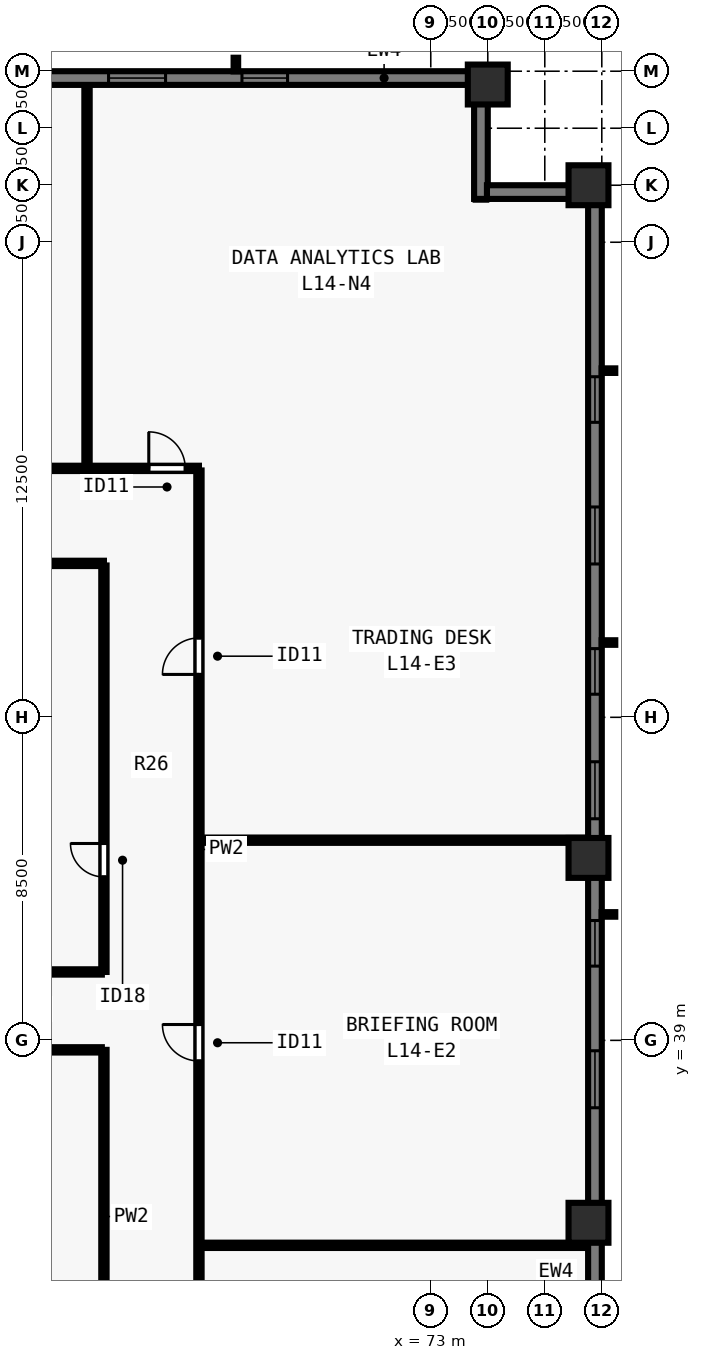
"""IFC4 building model, lengths in metres.
Left out: names, types, materials, properties, quantities, classifications, styles, units other than length and angle.
Written with IfcOpenShell. Run it as: python <this file> out.ifc"""

import sys

from ifc_helpers import new_model, si_unit, direction, frame, frame_2d, origin, origin_2d, place, context, subcontext, project, spatial, rectangle, extrude, element, fill, save


model = new_model("IFC4")
c1 = context("Model", 3, precision=1e-05, world=origin(), true_north=direction((0.0, 1.0)))
c2 = subcontext(c1, "Body", "Model", "MODEL_VIEW")
j1 = project(units=[si_unit("LENGTHUNIT", "METRE"), si_unit("PLANEANGLEUNIT", "RADIAN")], contexts=[c1])
p1 = place(None, origin())
s1 = spatial("IfcSite", under=j1, at=p1, CompositionType="ELEMENT")
p2 = place(p1, origin())
s2 = spatial("IfcBuilding", under=s1, at=p2, CompositionType="ELEMENT")
p3 = place(p2, frame((0.0, 0.0, 55.0)))
s3 = spatial("IfcBuildingStorey", under=s2, at=p3, CompositionType="ELEMENT", Elevation=55.0)
for number, where, z_axis, x_axis in (
    (1, (77.15, 34.2, 0.0), (0.0, 0.0, 1.0), (0.0, 1.0, 0.0)),
    (2, (77.15, 43.8, 0.0), (0.0, 0.0, 1.0), (0.0, 1.0, 0.0)),
    (3, (77.15, 61.5, 0.0), (0.0, 0.0, 1.0), (0.0, 1.0, 0.0)),
    (4, (74.5, 64.15, 0.0), (0.0, 0.0, 1.0), (1.0, 0.0, 0.0)),
):
    element("IfcColumn", number, at=place(p3, frame(where, z_axis=z_axis, x_axis=x_axis)), inside=s3, PredefinedType="COLUMN", context=c2, shape_type="SweptSolid", body=[
        extrude(rectangle(XDim=1.05, YDim=1.05, at=origin_2d()), origin(), (0.0, 0.0, 1.0), 3.5),
    ])
p4 = place(p3, frame((29.5, 64.32, 0.0), z_axis=(0.0, 0.0, 1.0), x_axis=(1.0, 0.0, 0.0)))
e5 = element("IfcWall", 5, at=p4, inside=s3, PredefinedType="SOLIDWALL", context=c2, shape_type="SweptSolid", body=[
    extrude(rectangle(XDim=44.662, YDim=0.36, at=frame_2d((22.331, 0.0))), origin(), (0.0, 0.0, 1.0), 3.28),
])
p5 = place(p4, frame((4.93, 0.0, 0.8)))
e6 = element("IfcOpeningElement", 6, at=p5, cuts=e5, PredefinedType="OPENING", context=c2, shape_type="SweptSolid", body=[
    extrude(rectangle(XDim=1.2, YDim=1.544, at=frame_2d((0.6, 0.772))), frame((0.0, 0.19, 0.0), z_axis=(0.0, -1.0, 0.0), x_axis=(1.0, 0.0, 0.0)), (0.0, 0.0, 1.0), 0.38),
])
p6 = place(p4, frame((7.29, 0.0, 0.8)))
e7 = element("IfcOpeningElement", 7, at=p6, cuts=e5, PredefinedType="OPENING", context=c2, shape_type="SweptSolid", body=[
    extrude(rectangle(XDim=1.5, YDim=1.544, at=frame_2d((0.75, 0.772))), frame((0.0, 0.19, 0.0), z_axis=(0.0, -1.0, 0.0), x_axis=(1.0, 0.0, 0.0)), (0.0, 0.0, 1.0), 0.38),
])
p7 = place(p4, frame((11.65, 0.0, 0.8)))
e8 = element("IfcOpeningElement", 8, at=p7, cuts=e5, PredefinedType="OPENING", context=c2, shape_type="SweptSolid", body=[
    extrude(rectangle(XDim=1.2, YDim=1.544, at=frame_2d((0.6, 0.772))), frame((0.0, 0.19, 0.0), z_axis=(0.0, -1.0, 0.0), x_axis=(1.0, 0.0, 0.0)), (0.0, 0.0, 1.0), 0.38),
])
p8 = place(p4, frame((14.861, 0.0, 0.8)))
e9 = element("IfcOpeningElement", 9, at=p8, cuts=e5, PredefinedType="OPENING", context=c2, shape_type="SweptSolid", body=[
    extrude(rectangle(XDim=1.5, YDim=1.544, at=frame_2d((0.75, 0.772))), frame((0.0, 0.19, 0.0), z_axis=(0.0, -1.0, 0.0), x_axis=(1.0, 0.0, 0.0)), (0.0, 0.0, 1.0), 0.38),
])
p9 = place(p4, frame((18.821, 0.0, 0.8)))
e10 = element("IfcOpeningElement", 10, at=p9, cuts=e5, PredefinedType="OPENING", context=c2, shape_type="SweptSolid", body=[
    extrude(rectangle(XDim=1.2, YDim=1.544, at=frame_2d((0.6, 0.772))), frame((0.0, 0.19, 0.0), z_axis=(0.0, -1.0, 0.0), x_axis=(1.0, 0.0, 0.0)), (0.0, 0.0, 1.0), 0.38),
])
p10 = place(p4, frame((20.731, 0.0, 0.8)))
e11 = element("IfcOpeningElement", 11, at=p10, cuts=e5, PredefinedType="OPENING", context=c2, shape_type="SweptSolid", body=[
    extrude(rectangle(XDim=1.5, YDim=1.544, at=frame_2d((0.75, 0.772))), frame((0.0, 0.19, 0.0), z_axis=(0.0, -1.0, 0.0), x_axis=(1.0, 0.0, 0.0)), (0.0, 0.0, 1.0), 0.38),
])
p11 = place(p4, frame((25.091, 0.0, 0.8)))
e12 = element("IfcOpeningElement", 12, at=p11, cuts=e5, PredefinedType="OPENING", context=c2, shape_type="SweptSolid", body=[
    extrude(rectangle(XDim=1.2, YDim=1.544, at=frame_2d((0.6, 0.772))), frame((0.0, 0.19, 0.0), z_axis=(0.0, -1.0, 0.0), x_axis=(1.0, 0.0, 0.0)), (0.0, 0.0, 1.0), 0.38),
])
p12 = place(p4, frame((28.302, 0.0, 0.8)))
e13 = element("IfcOpeningElement", 13, at=p12, cuts=e5, PredefinedType="OPENING", context=c2, shape_type="SweptSolid", body=[
    extrude(rectangle(XDim=1.5, YDim=1.544, at=frame_2d((0.75, 0.772))), frame((0.0, 0.19, 0.0), z_axis=(0.0, -1.0, 0.0), x_axis=(1.0, 0.0, 0.0)), (0.0, 0.0, 1.0), 0.38),
])
p13 = place(p4, frame((31.812, 0.0, 0.8)))
e14 = element("IfcOpeningElement", 14, at=p13, cuts=e5, PredefinedType="OPENING", context=c2, shape_type="SweptSolid", body=[
    extrude(rectangle(XDim=1.2, YDim=1.544, at=frame_2d((0.6, 0.772))), frame((0.0, 0.19, 0.0), z_axis=(0.0, -1.0, 0.0), x_axis=(1.0, 0.0, 0.0)), (0.0, 0.0, 1.0), 0.38),
])
p14 = place(p4, frame((35.022, 0.0, 0.8)))
e15 = element("IfcOpeningElement", 15, at=p14, cuts=e5, PredefinedType="OPENING", context=c2, shape_type="SweptSolid", body=[
    extrude(rectangle(XDim=1.5, YDim=1.544, at=frame_2d((0.75, 0.772))), frame((0.0, 0.19, 0.0), z_axis=(0.0, -1.0, 0.0), x_axis=(1.0, 0.0, 0.0)), (0.0, 0.0, 1.0), 0.38),
])
p15 = place(p4, frame((38.532, 0.0, 0.8)))
e16 = element("IfcOpeningElement", 16, at=p15, cuts=e5, PredefinedType="OPENING", context=c2, shape_type="SweptSolid", body=[
    extrude(rectangle(XDim=1.2, YDim=1.544, at=frame_2d((0.6, 0.772))), frame((0.0, 0.19, 0.0), z_axis=(0.0, -1.0, 0.0), x_axis=(1.0, 0.0, 0.0)), (0.0, 0.0, 1.0), 0.38),
])
p16 = place(p3, frame((74.32, 64.5, 0.0), z_axis=(0.0, 0.0, 1.0), x_axis=(0.0, -1.0, 0.0)))
e17 = element("IfcWall", 17, at=p16, inside=s3, PredefinedType="SOLIDWALL", context=c2, shape_type="SweptSolid", body=[
    extrude(rectangle(XDim=3.36, YDim=0.36, at=frame_2d((1.68, 0.0))), origin(), (0.0, 0.0, 1.0), 3.28),
])
p17 = place(p3, frame((74.478, 61.32, 0.0), z_axis=(0.0, 0.0, 1.0), x_axis=(1.0, 0.0, 0.0)))
e18 = element("IfcWall", 18, at=p17, inside=s3, PredefinedType="SOLIDWALL", context=c2, shape_type="SweptSolid", body=[
    extrude(rectangle(XDim=2.684, YDim=0.36, at=frame_2d((1.342, 0.0))), origin(), (0.0, 0.0, 1.0), 3.28),
])
p18 = place(p3, frame((77.32, 61.5, 0.0), z_axis=(0.0, 0.0, 1.0), x_axis=(0.0, -1.0, 0.0)))
e19 = element("IfcWall", 19, at=p18, inside=s3, PredefinedType="SOLIDWALL", context=c2, shape_type="SweptSolid", body=[
    extrude(rectangle(XDim=29.162, YDim=0.36, at=frame_2d((14.581, 0.0))), origin(), (0.0, 0.0, 1.0), 3.28),
])
p19 = place(p18, frame((5.039, 0.0, 0.8)))
e20 = element("IfcOpeningElement", 20, at=p19, cuts=e19, PredefinedType="OPENING", context=c2, shape_type="SweptSolid", body=[
    extrude(rectangle(XDim=1.2, YDim=1.544, at=frame_2d((0.6, 0.772))), frame((0.0, 0.19, 0.0), z_axis=(0.0, -1.0, 0.0), x_axis=(1.0, 0.0, 0.0)), (0.0, 0.0, 1.0), 0.38),
])
p20 = place(p18, frame((8.466, 0.0, 0.8)))
e21 = element("IfcOpeningElement", 21, at=p20, cuts=e19, PredefinedType="OPENING", context=c2, shape_type="SweptSolid", body=[
    extrude(rectangle(XDim=1.5, YDim=1.544, at=frame_2d((0.75, 0.772))), frame((0.0, 0.19, 0.0), z_axis=(0.0, -1.0, 0.0), x_axis=(1.0, 0.0, 0.0)), (0.0, 0.0, 1.0), 0.38),
])
p21 = place(p18, frame((12.192, 0.0, 0.8)))
e22 = element("IfcOpeningElement", 22, at=p21, cuts=e19, PredefinedType="OPENING", context=c2, shape_type="SweptSolid", body=[
    extrude(rectangle(XDim=1.2, YDim=1.544, at=frame_2d((0.6, 0.772))), frame((0.0, 0.19, 0.0), z_axis=(0.0, -1.0, 0.0), x_axis=(1.0, 0.0, 0.0)), (0.0, 0.0, 1.0), 0.38),
])
p22 = place(p18, frame((15.169, 0.0, 0.8)))
e23 = element("IfcOpeningElement", 23, at=p22, cuts=e19, PredefinedType="OPENING", context=c2, shape_type="SweptSolid", body=[
    extrude(rectangle(XDim=1.5, YDim=1.544, at=frame_2d((0.75, 0.772))), frame((0.0, 0.19, 0.0), z_axis=(0.0, -1.0, 0.0), x_axis=(1.0, 0.0, 0.0)), (0.0, 0.0, 1.0), 0.38),
])
p23 = place(p18, frame((19.346, 0.0, 0.8)))
e24 = element("IfcOpeningElement", 24, at=p23, cuts=e19, PredefinedType="OPENING", context=c2, shape_type="SweptSolid", body=[
    extrude(rectangle(XDim=1.2, YDim=1.544, at=frame_2d((0.6, 0.772))), frame((0.0, 0.19, 0.0), z_axis=(0.0, -1.0, 0.0), x_axis=(1.0, 0.0, 0.0)), (0.0, 0.0, 1.0), 0.38),
])
p24 = place(p18, frame((22.773, 0.0, 0.8)))
e25 = element("IfcOpeningElement", 25, at=p24, cuts=e19, PredefinedType="OPENING", context=c2, shape_type="SweptSolid", body=[
    extrude(rectangle(XDim=1.5, YDim=1.544, at=frame_2d((0.75, 0.772))), frame((0.0, 0.19, 0.0), z_axis=(0.0, -1.0, 0.0), x_axis=(1.0, 0.0, 0.0)), (0.0, 0.0, 1.0), 0.38),
])
p25 = place(p3, frame((37.1, 54.05, 0.0), z_axis=(0.0, 0.0, 1.0), x_axis=(1.0, 0.0, 0.0)))
e26 = element("IfcWall", 26, at=p25, inside=s3, PredefinedType="PARTITIONING", context=c2, shape_type="SweptSolid", body=[
    extrude(rectangle(XDim=29.8, YDim=0.14, at=frame_2d((14.9, 0.0))), origin(), (0.0, 0.0, 1.0), 3.28),
])
p26 = place(p25, frame((3.522, 0.0, 0.0)))
e27 = element("IfcOpeningElement", 27, at=p26, cuts=e26, PredefinedType="OPENING", context=c2, shape_type="SweptSolid", body=[
    extrude(rectangle(XDim=0.96, YDim=2.12, at=frame_2d((0.48, 1.06))), frame((0.0, 0.08, 0.0), z_axis=(0.0, -1.0, 0.0), x_axis=(1.0, 0.0, 0.0)), (0.0, 0.0, 1.0), 0.16),
])
p27 = place(p25, frame((8.06, 0.0, 0.0)))
e28 = element("IfcOpeningElement", 28, at=p27, cuts=e26, PredefinedType="OPENING", context=c2, shape_type="SweptSolid", body=[
    extrude(rectangle(XDim=0.96, YDim=2.12, at=frame_2d((0.48, 1.06))), frame((0.0, 0.08, 0.0), z_axis=(0.0, -1.0, 0.0), x_axis=(1.0, 0.0, 0.0)), (0.0, 0.0, 1.0), 0.16),
])
p28 = place(p25, frame((20.6, 0.0, 0.0)))
e29 = element("IfcOpeningElement", 29, at=p28, cuts=e26, PredefinedType="OPENING", context=c2, shape_type="SweptSolid", body=[
    extrude(rectangle(XDim=0.96, YDim=2.12, at=frame_2d((0.48, 1.06))), frame((0.0, 0.08, 0.0), z_axis=(0.0, -1.0, 0.0), x_axis=(1.0, 0.0, 0.0)), (0.0, 0.0, 1.0), 0.16),
])
p29 = place(p25, frame((28.48, 0.0, 0.0)))
e30 = element("IfcOpeningElement", 30, at=p29, cuts=e26, PredefinedType="OPENING", context=c2, shape_type="SweptSolid", body=[
    extrude(rectangle(XDim=0.96, YDim=2.12, at=frame_2d((0.48, 1.06))), frame((0.0, 0.08, 0.0), z_axis=(0.0, -1.0, 0.0), x_axis=(1.0, 0.0, 0.0)), (0.0, 0.0, 1.0), 0.16),
])
p30 = place(p3, frame((66.9, 24.005, 0.0), z_axis=(0.0, 0.0, 1.0), x_axis=(0.0, 1.0, 0.0)))
e31 = element("IfcWall", 31, at=p30, inside=s3, PredefinedType="PARTITIONING", context=c2, shape_type="SweptSolid", body=[
    extrude(rectangle(XDim=29.99, YDim=0.14, at=frame_2d((14.995, 0.0))), origin(), (0.0, 0.0, 1.0), 3.28),
])
p31 = place(p30, frame((4.344, 0.0, 0.0)))
e32 = element("IfcOpeningElement", 32, at=p31, cuts=e31, PredefinedType="OPENING", context=c2, shape_type="SweptSolid", body=[
    extrude(rectangle(XDim=0.96, YDim=2.12, at=frame_2d((0.48, 1.06))), frame((0.0, 0.08, 0.0), z_axis=(0.0, -1.0, 0.0), x_axis=(1.0, 0.0, 0.0)), (0.0, 0.0, 1.0), 0.16),
])
p32 = place(p30, frame((14.452, 0.0, 0.0)))
e33 = element("IfcOpeningElement", 33, at=p32, cuts=e31, PredefinedType="OPENING", context=c2, shape_type="SweptSolid", body=[
    extrude(rectangle(XDim=0.96, YDim=2.12, at=frame_2d((0.48, 1.06))), frame((0.0, 0.08, 0.0), z_axis=(0.0, -1.0, 0.0), x_axis=(1.0, 0.0, 0.0)), (0.0, 0.0, 1.0), 0.16),
])
p33 = place(p30, frame((24.623, 0.0, 0.0)))
e34 = element("IfcOpeningElement", 34, at=p33, cuts=e31, PredefinedType="OPENING", context=c2, shape_type="SweptSolid", body=[
    extrude(rectangle(XDim=0.96, YDim=2.12, at=frame_2d((0.48, 1.06))), frame((0.0, 0.08, 0.0), z_axis=(0.0, -1.0, 0.0), x_axis=(1.0, 0.0, 0.0)), (0.0, 0.0, 1.0), 0.16),
])
p34 = place(p3, frame((39.6, 51.55, 0.0), z_axis=(0.0, 0.0, 1.0), x_axis=(1.0, 0.0, 0.0)))
e35 = element("IfcWall", 35, at=p34, inside=s3, PredefinedType="PARTITIONING", context=c2, shape_type="SweptSolid", body=[
    extrude(rectangle(XDim=24.8, YDim=0.14, at=frame_2d((12.4, 0.0))), origin(), (0.0, 0.0, 1.0), 3.28),
])
p35 = place(p34, frame((3.2, 0.0, 0.0)))
e36 = element("IfcOpeningElement", 36, at=p35, cuts=e35, PredefinedType="OPENING", context=c2, shape_type="SweptSolid", body=[
    extrude(rectangle(XDim=0.96, YDim=2.12, at=frame_2d((0.48, 1.06))), frame((0.0, 0.08, 0.0), z_axis=(0.0, -1.0, 0.0), x_axis=(1.0, 0.0, 0.0)), (0.0, 0.0, 1.0), 0.16),
])
p36 = place(p34, frame((18.4, 0.0, 0.0)))
e37 = element("IfcOpeningElement", 37, at=p36, cuts=e35, PredefinedType="OPENING", context=c2, shape_type="SweptSolid", body=[
    extrude(rectangle(XDim=0.96, YDim=2.12, at=frame_2d((0.48, 1.06))), frame((0.0, 0.08, 0.0), z_axis=(0.0, -1.0, 0.0), x_axis=(1.0, 0.0, 0.0)), (0.0, 0.0, 1.0), 0.16),
])
p37 = place(p3, frame((64.4, 26.505, 0.0), z_axis=(0.0, 0.0, 1.0), x_axis=(0.0, 1.0, 0.0)))
e38 = element("IfcWall", 38, at=p37, inside=s3, PredefinedType="PARTITIONING", context=c2, shape_type="SweptSolid", body=[
    extrude(rectangle(XDim=12.245, YDim=0.14, at=frame_2d((6.123, 0.0))), origin(), (0.0, 0.0, 1.0), 3.28),
])
p38 = place(p37, frame((2.445, 0.0, 0.0)))
e39 = element("IfcOpeningElement", 39, at=p38, cuts=e38, PredefinedType="OPENING", context=c2, shape_type="SweptSolid", body=[
    extrude(rectangle(XDim=0.88, YDim=2.1, at=frame_2d((0.44, 1.05))), frame((0.0, 0.08, 0.0), z_axis=(0.0, -1.0, 0.0), x_axis=(1.0, 0.0, 0.0)), (0.0, 0.0, 1.0), 0.16),
])
p39 = place(p3, frame((64.4, 40.8, 0.0), z_axis=(0.0, 0.0, 1.0), x_axis=(0.0, 1.0, 0.0)))
e40 = element("IfcWall", 40, at=p39, inside=s3, PredefinedType="PARTITIONING", context=c2, shape_type="SweptSolid", body=[
    extrude(rectangle(XDim=10.695, YDim=0.14, at=frame_2d((5.348, 0.0))), origin(), (0.0, 0.0, 1.0), 3.28),
])
p40 = place(p39, frame((2.5, 0.0, 0.0)))
e41 = element("IfcOpeningElement", 41, at=p40, cuts=e40, PredefinedType="OPENING", context=c2, shape_type="SweptSolid", body=[
    extrude(rectangle(XDim=0.88, YDim=2.1, at=frame_2d((0.44, 1.05))), frame((0.0, 0.08, 0.0), z_axis=(0.0, -1.0, 0.0), x_axis=(1.0, 0.0, 0.0)), (0.0, 0.0, 1.0), 0.16),
])
for number, where, z_axis, x_axis in (
    (42, (60.76, 38.75, 0.0), (0.0, 0.0, 1.0), (1.0, 0.0, 0.0)),
    (43, (60.76, 40.8, 0.0), (0.0, 0.0, 1.0), (1.0, 0.0, 0.0)),
):
    element("IfcWall", number, at=place(p3, frame(where, z_axis=z_axis, x_axis=x_axis)), inside=s3, PredefinedType="PARTITIONING", context=c2, shape_type="SweptSolid", body=[
        extrude(rectangle(XDim=3.585, YDim=0.14, at=frame_2d((1.792, 0.0))), origin(), (0.0, 0.0, 1.0), 3.28),
    ])
p41 = place(p3, frame((63.955, 54.15, 0.0), z_axis=(0.0, 0.0, 1.0), x_axis=(0.0, 1.0, 0.0)))
e44 = element("IfcWall", 44, at=p41, inside=s3, PredefinedType="PARTITIONING", context=c2, shape_type="SweptSolid", body=[
    extrude(rectangle(XDim=9.93, YDim=0.14, at=frame_2d((4.965, 0.0))), origin(), (0.0, 0.0, 1.0), 3.28),
])
for number, where, z_axis, x_axis in (
    (45, (67.0, 33.607, 0.0), (0.0, 0.0, 1.0), (1.0, 0.0, 0.0)),
    (46, (67.0, 44.267, 0.0), (0.0, 0.0, 1.0), (1.0, 0.0, 0.0)),
):
    element("IfcWall", number, at=place(p3, frame(where, z_axis=z_axis, x_axis=x_axis)), inside=s3, PredefinedType="PARTITIONING", context=c2, shape_type="SweptSolid", body=[
        extrude(rectangle(XDim=10.08, YDim=0.14, at=frame_2d((5.04, 0.0))), origin(), (0.0, 0.0, 1.0), 2.439),
    ])
p42 = place(p14, origin())
e47 = element("IfcWindow", 47, at=p42, inside=s3, PartitioningType="SINGLE_PANEL", PredefinedType="WINDOW", context=c2, shape_type="SweptSolid", body=[
    extrude(rectangle(XDim=1.5, YDim=1.544, at=frame_2d((0.75, 0.772))), frame((0.0, -0.05, 0.0), z_axis=(0.0, -1.0, 0.0), x_axis=(1.0, 0.0, 0.0)), (0.0, 0.0, 1.0), 0.06),
])
fill(e15, e47)
p43 = place(p15, origin())
e48 = element("IfcWindow", 48, at=p43, inside=s3, PartitioningType="SINGLE_PANEL", PredefinedType="WINDOW", context=c2, shape_type="SweptSolid", body=[
    extrude(rectangle(XDim=1.2, YDim=1.544, at=frame_2d((0.6, 0.772))), frame((0.0, -0.05, 0.0), z_axis=(0.0, -1.0, 0.0), x_axis=(1.0, 0.0, 0.0)), (0.0, 0.0, 1.0), 0.06),
])
fill(e16, e48)
p44 = place(p19, origin())
e49 = element("IfcWindow", 49, at=p44, inside=s3, PartitioningType="SINGLE_PANEL", PredefinedType="WINDOW", context=c2, shape_type="SweptSolid", body=[
    extrude(rectangle(XDim=1.2, YDim=1.544, at=frame_2d((0.6, 0.772))), frame((0.0, -0.05, 0.0), z_axis=(0.0, -1.0, 0.0), x_axis=(1.0, 0.0, 0.0)), (0.0, 0.0, 1.0), 0.06),
])
fill(e20, e49)
p45 = place(p20, origin())
e50 = element("IfcWindow", 50, at=p45, inside=s3, PartitioningType="SINGLE_PANEL", PredefinedType="WINDOW", context=c2, shape_type="SweptSolid", body=[
    extrude(rectangle(XDim=1.5, YDim=1.544, at=frame_2d((0.75, 0.772))), frame((0.0, -0.05, 0.0), z_axis=(0.0, -1.0, 0.0), x_axis=(1.0, 0.0, 0.0)), (0.0, 0.0, 1.0), 0.06),
])
fill(e21, e50)
p46 = place(p21, origin())
e51 = element("IfcWindow", 51, at=p46, inside=s3, PartitioningType="SINGLE_PANEL", PredefinedType="WINDOW", context=c2, shape_type="SweptSolid", body=[
    extrude(rectangle(XDim=1.2, YDim=1.544, at=frame_2d((0.6, 0.772))), frame((0.0, -0.05, 0.0), z_axis=(0.0, -1.0, 0.0), x_axis=(1.0, 0.0, 0.0)), (0.0, 0.0, 1.0), 0.06),
])
fill(e22, e51)
p47 = place(p22, origin())
e52 = element("IfcWindow", 52, at=p47, inside=s3, PartitioningType="SINGLE_PANEL", PredefinedType="WINDOW", context=c2, shape_type="SweptSolid", body=[
    extrude(rectangle(XDim=1.5, YDim=1.544, at=frame_2d((0.75, 0.772))), frame((0.0, -0.05, 0.0), z_axis=(0.0, -1.0, 0.0), x_axis=(1.0, 0.0, 0.0)), (0.0, 0.0, 1.0), 0.06),
])
fill(e23, e52)
p48 = place(p23, origin())
e53 = element("IfcWindow", 53, at=p48, inside=s3, PartitioningType="SINGLE_PANEL", PredefinedType="WINDOW", context=c2, shape_type="SweptSolid", body=[
    extrude(rectangle(XDim=1.2, YDim=1.544, at=frame_2d((0.6, 0.772))), frame((0.0, -0.05, 0.0), z_axis=(0.0, -1.0, 0.0), x_axis=(1.0, 0.0, 0.0)), (0.0, 0.0, 1.0), 0.06),
])
fill(e24, e53)
p49 = place(p24, origin())
e54 = element("IfcWindow", 54, at=p49, inside=s3, PartitioningType="SINGLE_PANEL", PredefinedType="WINDOW", context=c2, shape_type="SweptSolid", body=[
    extrude(rectangle(XDim=1.5, YDim=1.544, at=frame_2d((0.75, 0.772))), frame((0.0, -0.05, 0.0), z_axis=(0.0, -1.0, 0.0), x_axis=(1.0, 0.0, 0.0)), (0.0, 0.0, 1.0), 0.06),
])
fill(e25, e54)
p50 = place(p40, origin())
e55 = element("IfcDoor", 55, at=p50, inside=s3, OperationType="SINGLE_SWING_RIGHT", PredefinedType="DOOR", context=c2, shape_type="SweptSolid", body=[
    extrude(rectangle(XDim=0.88, YDim=2.1, at=frame_2d((0.44, 1.05))), frame((0.0, 0.025, 0.0), z_axis=(0.0, -1.0, 0.0), x_axis=(1.0, 0.0, 0.0)), (0.0, 0.0, 1.0), 0.05),
])
fill(e41, e55)
p51 = place(p29, origin())
e56 = element("IfcDoor", 56, at=p51, inside=s3, OperationType="SINGLE_SWING_LEFT", PredefinedType="DOOR", context=c2, shape_type="SweptSolid", body=[
    extrude(rectangle(XDim=0.96, YDim=2.12, at=frame_2d((0.48, 1.06))), frame((0.0, 0.025, 0.0), z_axis=(0.0, -1.0, 0.0), x_axis=(1.0, 0.0, 0.0)), (0.0, 0.0, 1.0), 0.05),
])
fill(e30, e56)
p52 = place(p32, origin())
e57 = element("IfcDoor", 57, at=p52, inside=s3, OperationType="SINGLE_SWING_RIGHT", PredefinedType="DOOR", context=c2, shape_type="SweptSolid", body=[
    extrude(rectangle(XDim=0.96, YDim=2.12, at=frame_2d((0.48, 1.06))), frame((0.0, 0.025, 0.0), z_axis=(0.0, -1.0, 0.0), x_axis=(1.0, 0.0, 0.0)), (0.0, 0.0, 1.0), 0.05),
])
fill(e33, e57)
p53 = place(p33, origin())
e58 = element("IfcDoor", 58, at=p53, inside=s3, OperationType="SINGLE_SWING_LEFT", PredefinedType="DOOR", context=c2, shape_type="SweptSolid", body=[
    extrude(rectangle(XDim=0.96, YDim=2.12, at=frame_2d((0.48, 1.06))), frame((0.0, 0.025, 0.0), z_axis=(0.0, -1.0, 0.0), x_axis=(1.0, 0.0, 0.0)), (0.0, 0.0, 1.0), 0.05),
])
fill(e34, e58)
save(model, sys.argv[1])
